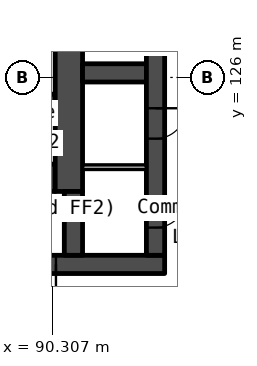
"""IFC4 building model, lengths in metres.
Left out: names, types, materials, properties, quantities, classifications, styles, units other than length and angle.
Written with IfcOpenShell. Run it as: python <this file> out.ifc"""

import sys

from ifc_helpers import new_model, si_unit, direction, frame, frame_2d, origin, place, context, subcontext, project, spatial, rectangle, extrude, element, fill, save


model = new_model("IFC4")
c1 = context("Model", 3, precision=1e-05, world=origin(), true_north=direction((0.0, 1.0)))
c2 = subcontext(c1, "Body", "Model", "MODEL_VIEW")
j1 = project(units=[si_unit("LENGTHUNIT", "METRE"), si_unit("PLANEANGLEUNIT", "RADIAN")], contexts=[c1])
p1 = place(None, origin())
s1 = spatial("IfcSite", under=j1, at=p1, CompositionType="ELEMENT")
p2 = place(p1, origin())
s2 = spatial("IfcBuilding", under=s1, at=p2, CompositionType="ELEMENT")
p3 = place(p2, frame((0.0, 0.0, 7.5)))
s3 = spatial("IfcBuildingStorey", under=s2, at=p3, CompositionType="ELEMENT", Elevation=7.5)
p4 = place(p3, frame((66.0, 119.85, 0.0), z_axis=(0.0, 0.0, 1.0), x_axis=(1.0, 0.0, 0.0)))
e1 = element("IfcWall", 1, at=p4, inside=s3, PredefinedType="SOLIDWALL", context=c2, shape_type="SweptSolid", body=[
    extrude(rectangle(XDim=28.0, YDim=0.6, at=frame_2d((14.0, 0.0))), origin(), (0.0, 0.0, 1.0), 5.7),
])
p5 = place(p4, frame((6.825, 0.0, 0.0)))
e2 = element("IfcOpeningElement", 2, at=p5, cuts=e1, PredefinedType="OPENING", context=c2, shape_type="SweptSolid", body=[
    extrude(rectangle(XDim=1.8, YDim=2.1, at=frame_2d((0.9, 1.05))), frame((0.0, 0.31, 0.0), z_axis=(0.0, -1.0, 0.0), x_axis=(1.0, 0.0, 0.0)), (0.0, 0.0, 1.0), 0.62),
])
p6 = place(p4, frame((15.85, 0.0, 0.0)))
e3 = element("IfcOpeningElement", 3, at=p6, cuts=e1, PredefinedType="OPENING", context=c2, shape_type="SweptSolid", body=[
    extrude(rectangle(XDim=1.5, YDim=2.1, at=frame_2d((0.75, 1.05))), frame((0.0, 0.31, 0.0), z_axis=(0.0, -1.0, 0.0), x_axis=(1.0, 0.0, 0.0)), (0.0, 0.0, 1.0), 0.62),
])
p7 = place(p4, frame((19.375, 0.0, 0.0)))
e4 = element("IfcOpeningElement", 4, at=p7, cuts=e1, PredefinedType="OPENING", context=c2, shape_type="SweptSolid", body=[
    extrude(rectangle(XDim=1.8, YDim=2.1, at=frame_2d((0.9, 1.05))), frame((0.0, 0.31, 0.0), z_axis=(0.0, -1.0, 0.0), x_axis=(1.0, 0.0, 0.0)), (0.0, 0.0, 1.0), 0.62),
])
p8 = place(p4, frame((4.425, 0.0, 0.0)))
e5 = element("IfcOpeningElement", 5, at=p8, cuts=e1, PredefinedType="OPENING", context=c2, shape_type="SweptSolid", body=[
    extrude(rectangle(XDim=1.0, YDim=2.1, at=frame_2d((0.5, 1.05))), frame((0.0, 0.31, 0.0), z_axis=(0.0, -1.0, 0.0), x_axis=(1.0, 0.0, 0.0)), (0.0, 0.0, 1.0), 0.62),
])
p9 = place(p4, frame((9.783, 0.0, 0.0)))
e6 = element("IfcOpeningElement", 6, at=p9, cuts=e1, PredefinedType="OPENING", context=c2, shape_type="SweptSolid", body=[
    extrude(rectangle(XDim=1.0, YDim=2.1, at=frame_2d((0.5, 1.05))), frame((0.0, 0.31, 0.0), z_axis=(0.0, -1.0, 0.0), x_axis=(1.0, 0.0, 0.0)), (0.0, 0.0, 1.0), 0.62),
])
p10 = place(p4, frame((11.525, 0.0, 0.0)))
e7 = element("IfcOpeningElement", 7, at=p10, cuts=e1, PredefinedType="OPENING", context=c2, shape_type="SweptSolid", body=[
    extrude(rectangle(XDim=1.0, YDim=2.1, at=frame_2d((0.5, 1.05))), frame((0.0, 0.31, 0.0), z_axis=(0.0, -1.0, 0.0), x_axis=(1.0, 0.0, 0.0)), (0.0, 0.0, 1.0), 0.62),
])
p11 = place(p4, frame((13.658, 0.0, 0.0)))
e8 = element("IfcOpeningElement", 8, at=p11, cuts=e1, PredefinedType="OPENING", context=c2, shape_type="SweptSolid", body=[
    extrude(rectangle(XDim=1.0, YDim=2.1, at=frame_2d((0.5, 1.05))), frame((0.0, 0.31, 0.0), z_axis=(0.0, -1.0, 0.0), x_axis=(1.0, 0.0, 0.0)), (0.0, 0.0, 1.0), 0.62),
])
p12 = place(p4, frame((21.725, 0.0, 0.0)))
e9 = element("IfcOpeningElement", 9, at=p12, cuts=e1, PredefinedType="OPENING", context=c2, shape_type="SweptSolid", body=[
    extrude(rectangle(XDim=1.0, YDim=2.1, at=frame_2d((0.5, 1.05))), frame((0.0, 0.31, 0.0), z_axis=(0.0, -1.0, 0.0), x_axis=(1.0, 0.0, 0.0)), (0.0, 0.0, 1.0), 0.62),
])
p13 = place(p4, frame((23.425, 0.0, 0.0)))
e10 = element("IfcOpeningElement", 10, at=p13, cuts=e1, PredefinedType="OPENING", context=c2, shape_type="SweptSolid", body=[
    extrude(rectangle(XDim=1.0, YDim=2.1, at=frame_2d((0.5, 1.05))), frame((0.0, 0.31, 0.0), z_axis=(0.0, -1.0, 0.0), x_axis=(1.0, 0.0, 0.0)), (0.0, 0.0, 1.0), 0.62),
])
p14 = place(p3, frame((87.85, 125.3, 0.0), z_axis=(0.0, 0.0, 1.0), x_axis=(1.0, 0.0, 0.0)))
e11 = element("IfcWall", 11, at=p14, inside=s3, PredefinedType="SOLIDWALL", context=c2, shape_type="SweptSolid", body=[
    extrude(rectangle(XDim=2.55, YDim=0.3, at=frame_2d((1.275, 0.0))), origin(), (0.0, 0.0, 1.0), 5.7),
])
p15 = place(p3, frame((87.85, 122.7, 0.0), z_axis=(0.0, 0.0, 1.0), x_axis=(1.0, 0.0, 0.0)))
e12 = element("IfcWall", 12, at=p15, inside=s3, PredefinedType="SOLIDWALL", context=c2, shape_type="SweptSolid", body=[
    extrude(rectangle(XDim=2.55, YDim=0.9, at=frame_2d((1.275, 0.0))), origin(), (0.0, 0.0, 1.0), 5.7),
])
p16 = place(p3, frame((90.85, 133.95, 0.0), z_axis=(0.0, 0.0, 1.0), x_axis=(0.0, -1.0, 0.0)))
e13 = element("IfcWall", 13, at=p16, inside=s3, PredefinedType="SOLIDWALL", context=c2, shape_type="SweptSolid", body=[
    extrude(rectangle(XDim=11.7, YDim=0.9, at=frame_2d((5.85, 0.0))), origin(), (0.0, 0.0, 1.0), 5.7),
])
p17 = place(p3, frame((91.0, 122.25, 0.0), z_axis=(0.0, 0.0, 1.0), x_axis=(0.0, -1.0, 0.0)))
e14 = element("IfcWall", 14, at=p17, inside=s3, PredefinedType="SOLIDWALL", context=c2, shape_type="SweptSolid", body=[
    extrude(rectangle(XDim=2.1, YDim=0.6, at=frame_2d((1.05, 0.0))), origin(), (0.0, 0.0, 1.0), 5.7),
])
p18 = place(p3, frame((91.3, 126.15, 0.0), z_axis=(0.0, 0.0, 1.0), x_axis=(1.0, 0.0, 0.0)))
e15 = element("IfcWall", 15, at=p18, inside=s3, PredefinedType="SOLIDWALL", context=c2, shape_type="SweptSolid", body=[
    extrude(rectangle(XDim=2.1, YDim=0.6, at=frame_2d((1.05, 0.0))), origin(), (0.0, 0.0, 1.0), 5.7),
])
p19 = place(p3, frame((91.3, 123.049, 0.0), z_axis=(0.0, 0.0, 1.0), x_axis=(1.0, 0.0, 0.0)))
e16 = element("IfcWall", 16, at=p19, inside=s3, PredefinedType="PARTITIONING", context=c2, shape_type="SweptSolid", body=[
    extrude(rectangle(XDim=2.1, YDim=0.15, at=frame_2d((1.05, 0.0))), origin(), (0.0, 0.0, 1.0), 5.7),
])
p20 = place(p3, frame((93.7, 133.95, 0.0), z_axis=(0.0, 0.0, 1.0), x_axis=(0.0, -1.0, 0.0)))
e17 = element("IfcWall", 17, at=p20, inside=s3, PredefinedType="SOLIDWALL", context=c2, shape_type="SweptSolid", body=[
    extrude(rectangle(XDim=13.8, YDim=0.6, at=frame_2d((6.9, 0.0))), origin(), (0.0, 0.0, 1.0), 5.7),
])
p21 = place(p20, frame((0.6, 0.0, 0.0)))
e18 = element("IfcOpeningElement", 18, at=p21, cuts=e17, PredefinedType="OPENING", context=c2, shape_type="SweptSolid", body=[
    extrude(rectangle(XDim=1.1, YDim=2.1, at=frame_2d((0.55, 1.05))), frame((0.0, 0.31, 0.0), z_axis=(0.0, -1.0, 0.0), x_axis=(1.0, 0.0, 0.0)), (0.0, 0.0, 1.0), 0.62),
])
p22 = place(p20, frame((8.963, 0.0, 0.0)))
e19 = element("IfcOpeningElement", 19, at=p22, cuts=e17, PredefinedType="OPENING", context=c2, shape_type="SweptSolid", body=[
    extrude(rectangle(XDim=1.0, YDim=2.1, at=frame_2d((0.5, 1.05))), frame((0.0, 0.31, 0.0), z_axis=(0.0, -1.0, 0.0), x_axis=(1.0, 0.0, 0.0)), (0.0, 0.0, 1.0), 0.62),
])
p23 = place(p20, frame((11.888, 0.0, 0.0)))
e20 = element("IfcOpeningElement", 20, at=p23, cuts=e17, PredefinedType="OPENING", context=c2, shape_type="SweptSolid", body=[
    extrude(rectangle(XDim=1.0, YDim=2.1, at=frame_2d((0.5, 1.05))), frame((0.0, 0.31, 0.0), z_axis=(0.0, -1.0, 0.0), x_axis=(1.0, 0.0, 0.0)), (0.0, 0.0, 1.0), 0.62),
])
p24 = place(p22, origin())
e21 = element("IfcDoor", 21, at=p24, inside=s3, OperationType="SINGLE_SWING_LEFT", PredefinedType="DOOR", context=c2, shape_type="SweptSolid", body=[
    extrude(rectangle(XDim=1.0, YDim=2.1, at=frame_2d((0.5, 1.05))), frame((0.0, 0.025, 0.0), z_axis=(0.0, -1.0, 0.0), x_axis=(1.0, 0.0, 0.0)), (0.0, 0.0, 1.0), 0.05),
])
fill(e19, e21)
p25 = place(p23, origin())
e22 = element("IfcDoor", 22, at=p25, inside=s3, OperationType="SINGLE_SWING_LEFT", PredefinedType="DOOR", context=c2, shape_type="SweptSolid", body=[
    extrude(rectangle(XDim=1.0, YDim=2.1, at=frame_2d((0.5, 1.05))), frame((0.0, 0.025, 0.0), z_axis=(0.0, -1.0, 0.0), x_axis=(1.0, 0.0, 0.0)), (0.0, 0.0, 1.0), 0.05),
])
fill(e20, e22)
p26 = place(p13, origin())
e23 = element("IfcDoor", 23, at=p26, inside=s3, OperationType="SINGLE_SWING_RIGHT", PredefinedType="DOOR", context=c2, shape_type="SweptSolid", body=[
    extrude(rectangle(XDim=1.0, YDim=2.1, at=frame_2d((0.5, 1.05))), frame((0.0, 0.025, 0.0), z_axis=(0.0, -1.0, 0.0), x_axis=(1.0, 0.0, 0.0)), (0.0, 0.0, 1.0), 0.05),
])
fill(e10, e23)
save(model, sys.argv[1])
